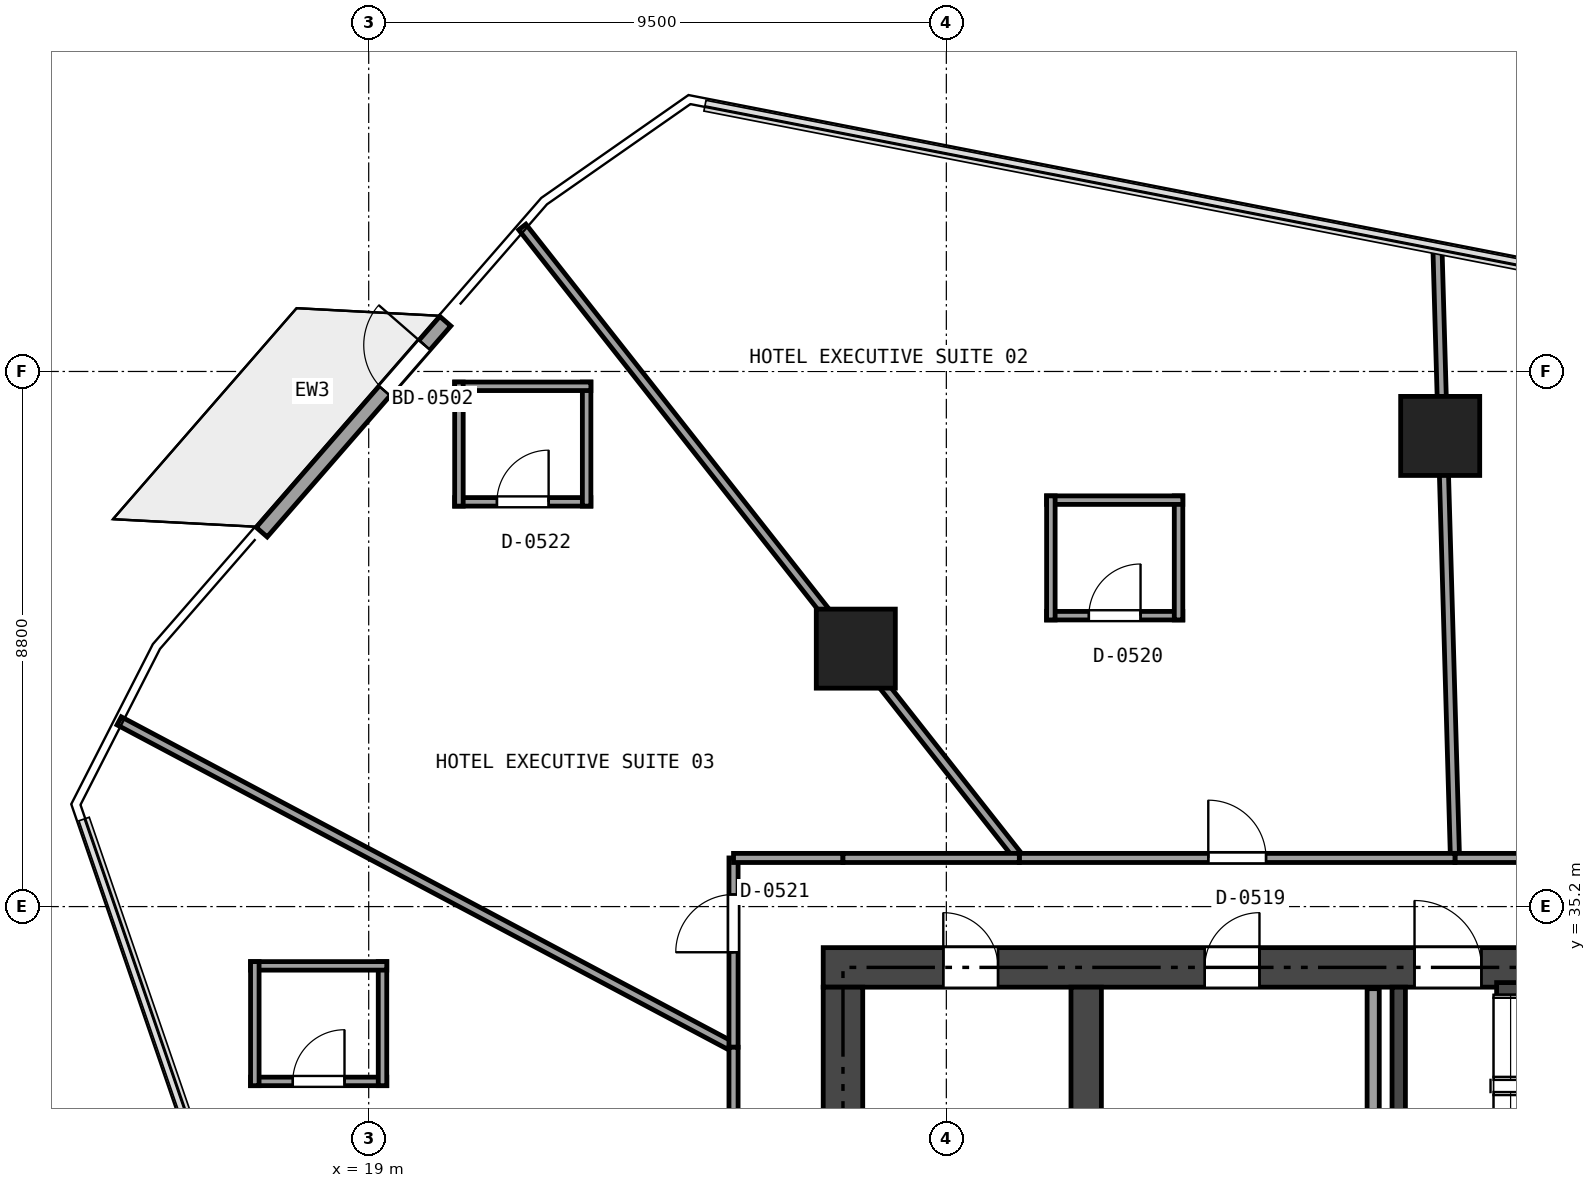
"""IFC4 building model, lengths in metres.
Left out: names, types, materials, properties, quantities, classifications, styles, units other than length and angle.
Written with IfcOpenShell. Run it as: python <this file> out.ifc"""

import sys

from ifc_helpers import new_model, si_unit, direction, frame, frame_2d, origin, origin_2d, place, context, subcontext, project, spatial, rectangle, extrude, element, fill, save


model = new_model("IFC4")
c1 = context("Model", 3, precision=1e-05, world=origin(), true_north=direction((0.0, 1.0)))
c2 = subcontext(c1, "Body", "Model", "MODEL_VIEW")
j1 = project(units=[si_unit("LENGTHUNIT", "METRE"), si_unit("PLANEANGLEUNIT", "RADIAN")], contexts=[c1])
p1 = place(None, origin())
s1 = spatial("IfcSite", under=j1, at=p1, CompositionType="ELEMENT")
p2 = place(p1, origin())
s2 = spatial("IfcBuilding", under=s1, at=p2, CompositionType="ELEMENT")
p3 = place(p2, frame((0.0, 0.0, 27.0)))
s3 = spatial("IfcBuildingStorey", under=s2, at=p3, CompositionType="ELEMENT", Elevation=27.0)
p4 = place(p3, frame((26.475, 34.2, 0.0), z_axis=(0.0, 0.0, 1.0), x_axis=(1.0, 0.0, 0.0)))
e1 = element("IfcWall", 1, at=p4, inside=s3, PredefinedType="SHEAR", context=c2, shape_type="SweptSolid", body=[
    extrude(rectangle(XDim=21.45, YDim=0.65, at=frame_2d((10.725, 0.0))), origin(), (0.0, 0.0, 1.0), 3.17),
])
p5 = place(p4, frame((9.725, 0.0, 0.0)))
e2 = element("IfcOpeningElement", 2, at=p5, cuts=e1, PredefinedType="OPENING", context=c2, shape_type="SweptSolid", body=[
    extrude(rectangle(XDim=1.1, YDim=2.15, at=frame_2d((0.55, 1.075))), frame((0.0, 0.335, 0.0), z_axis=(0.0, -1.0, 0.0), x_axis=(1.0, 0.0, 0.0)), (0.0, 0.0, 1.0), 0.67),
])
p6 = place(p4, frame((1.975, 0.0, 0.0)))
e3 = element("IfcOpeningElement", 3, at=p6, cuts=e1, PredefinedType="OPENING", context=c2, shape_type="SweptSolid", body=[
    extrude(rectangle(XDim=0.9, YDim=2.1, at=frame_2d((0.45, 1.05))), frame((0.0, 0.335, 0.0), z_axis=(0.0, -1.0, 0.0), x_axis=(1.0, 0.0, 0.0)), (0.0, 0.0, 1.0), 0.67),
])
p7 = place(p4, frame((6.275, 0.0, 0.0)))
e4 = element("IfcOpeningElement", 4, at=p7, cuts=e1, PredefinedType="OPENING", context=c2, shape_type="SweptSolid", body=[
    extrude(rectangle(XDim=0.9, YDim=2.1, at=frame_2d((0.45, 1.05))), frame((0.0, 0.335, 0.0), z_axis=(0.0, -1.0, 0.0), x_axis=(1.0, 0.0, 0.0)), (0.0, 0.0, 1.0), 0.67),
])
p8 = place(p3, frame((26.8, 18.925, 0.0), z_axis=(0.0, 0.0, 1.0), x_axis=(0.0, 1.0, 0.0)))
e5 = element("IfcWall", 5, at=p8, inside=s3, PredefinedType="SHEAR", context=c2, shape_type="SweptSolid", body=[
    extrude(rectangle(XDim=14.95, YDim=0.65, at=frame_2d((7.475, 0.0))), origin(), (0.0, 0.0, 1.0), 3.17),
])
p9 = place(p3, frame((30.8, 18.925, 0.0), z_axis=(0.0, 0.0, 1.0), x_axis=(0.0, 1.0, 0.0)))
e6 = element("IfcWall", 6, at=p9, inside=s3, PredefinedType="SHEAR", context=c2, shape_type="SweptSolid", body=[
    extrude(rectangle(XDim=14.95, YDim=0.5, at=frame_2d((7.475, 0.0))), origin(), (0.0, 0.0, 1.0), 3.17),
])
p10 = place(p9, frame((6.575, 0.0, 0.0)))
e7 = element("IfcOpeningElement", 7, at=p10, cuts=e6, PredefinedType="OPENING", context=c2, shape_type="SweptSolid", body=[
    extrude(rectangle(XDim=1.1, YDim=2.15, at=frame_2d((0.55, 1.075))), frame((0.0, 0.26, 0.0), z_axis=(0.0, -1.0, 0.0), x_axis=(1.0, 0.0, 0.0)), (0.0, 0.0, 1.0), 0.52),
])
p11 = place(p9, frame((8.375, 0.0, 0.0)))
e8 = element("IfcOpeningElement", 8, at=p11, cuts=e6, PredefinedType="OPENING", context=c2, shape_type="SweptSolid", body=[
    extrude(rectangle(XDim=0.9, YDim=2.1, at=frame_2d((0.45, 1.05))), frame((0.0, 0.26, 0.0), z_axis=(0.0, -1.0, 0.0), x_axis=(1.0, 0.0, 0.0)), (0.0, 0.0, 1.0), 0.52),
])
p12 = place(p3, frame((35.94, 30.75, 0.0), z_axis=(0.0, 0.0, 1.0), x_axis=(0.0, 1.0, 0.0)))
e9 = element("IfcWall", 9, at=p12, inside=s3, PredefinedType="SHEAR", context=c2, shape_type="SweptSolid", body=[
    extrude(rectangle(XDim=3.125, YDim=0.22, at=frame_2d((1.562, 0.0))), origin(), (0.0, 0.0, 1.0), 3.17),
])
p13 = place(p3, frame((37.55, 33.84, 0.0), z_axis=(0.0, 0.0, 1.0), x_axis=(1.0, 0.0, 0.0)))
e10 = element("IfcWall", 10, at=p13, inside=s3, PredefinedType="SHEAR", context=c2, shape_type="SweptSolid", body=[
    extrude(rectangle(XDim=5.9, YDim=0.22, at=frame_2d((2.95, 0.0))), origin(), (0.0, 0.0, 1.0), 3.17),
])
for number, where, z_axis, x_axis in (
    (11, (36.622, 42.94, -0.405), (0.0, 0.0, 1.0), (1.0, 0.0, 0.0)),
    (12, (27.011, 39.442, -0.405), (0.0, 0.0, 1.0), (1.0, 0.0, 0.0)),
):
    element("IfcColumn", number, at=place(p3, frame(where, z_axis=z_axis, x_axis=x_axis)), inside=s3, PredefinedType="COLUMN", context=c2, shape_type="SweptSolid", body=[
        extrude(rectangle(XDim=1.3, YDim=1.3, at=origin_2d()), origin(), (0.0, 0.0, 1.0), 3.575),
    ])
p14 = place(p3, frame((17.24, 41.358, 0.0), z_axis=(0.0, 0.0, 1.0), x_axis=(0.656612282537, 0.754228288001, 0.0)))
e13 = element("IfcWall", 13, at=p14, inside=s3, PredefinedType="SOLIDWALL", context=c2, shape_type="SweptSolid", body=[
    extrude(rectangle(XDim=4.599, YDim=0.24, at=frame_2d((2.3, 0.0))), origin(), (0.0, 0.0, 1.0), 3.17),
])
p15 = place(p14, frame((3.079, 0.0, 0.0)))
e14 = element("IfcOpeningElement", 14, at=p15, cuts=e13, PredefinedType="OPENING", context=c2, shape_type="SweptSolid", body=[
    extrude(rectangle(XDim=1.0, YDim=2.15, at=frame_2d((0.5, 1.075))), frame((0.0, 0.13, 0.0), z_axis=(0.0, -1.0, 0.0), x_axis=(1.0, 0.0, 0.0)), (0.0, 0.0, 1.0), 0.26),
])
p16 = place(p3, frame((35.52, 18.95, 0.0), z_axis=(0.0, 0.0, 1.0), x_axis=(0.0, 1.0, 0.0)))
e15 = element("IfcWall", 15, at=p16, inside=s3, PredefinedType="SOLIDWALL", context=c2, shape_type="SweptSolid", body=[
    extrude(rectangle(XDim=14.9, YDim=0.2, at=frame_2d((7.45, 0.0))), origin(), (0.0, 0.0, 1.0), 2.691),
])
p17 = place(p16, frame((7.755, 0.0, 0.0)))
e16 = element("IfcOpeningElement", 16, at=p17, cuts=e15, PredefinedType="OPENING", context=c2, shape_type="SweptSolid", body=[
    extrude(rectangle(XDim=0.95, YDim=2.15, at=frame_2d((0.475, 1.075))), frame((0.0, 0.11, 0.0), z_axis=(0.0, -1.0, 0.0), x_axis=(1.0, 0.0, 0.0)), (0.0, 0.0, 1.0), 0.22),
])
p18 = place(p16, frame((0.6, 0.0, 0.0)))
e17 = element("IfcOpeningElement", 17, at=p18, cuts=e15, PredefinedType="OPENING", context=c2, shape_type="SweptSolid", body=[
    extrude(rectangle(XDim=0.9, YDim=2.1, at=frame_2d((0.45, 1.05))), frame((0.0, 0.11, 0.0), z_axis=(0.0, -1.0, 0.0), x_axis=(1.0, 0.0, 0.0)), (0.0, 0.0, 1.0), 0.22),
])
p19 = place(p3, frame((30.149, 39.984, 0.0), z_axis=(0.0, 0.0, 1.0), x_axis=(1.0, 0.0, 0.0)))
e18 = element("IfcWall", 18, at=p19, inside=s3, PredefinedType="PARTITIONING", context=c2, shape_type="SweptSolid", body=[
    extrude(rectangle(XDim=2.24, YDim=0.14, at=frame_2d((1.12, 0.0))), origin(), (0.0, 0.0, 1.0), 3.17),
])
p20 = place(p19, frame((0.695, 0.0, 0.0)))
e19 = element("IfcOpeningElement", 19, at=p20, cuts=e18, PredefinedType="OPENING", context=c2, shape_type="SweptSolid", body=[
    extrude(rectangle(XDim=0.85, YDim=2.1, at=frame_2d((0.425, 1.05))), frame((0.0, 0.08, 0.0), z_axis=(0.0, -1.0, 0.0), x_axis=(1.0, 0.0, 0.0)), (0.0, 0.0, 1.0), 0.16),
])
p21 = place(p3, frame((32.319, 39.914, 0.0), z_axis=(0.0, 0.0, 1.0), x_axis=(0.0, 1.0, 0.0)))
e20 = element("IfcWall", 20, at=p21, inside=s3, PredefinedType="PARTITIONING", context=c2, shape_type="SweptSolid", body=[
    extrude(rectangle(XDim=2.04, YDim=0.14, at=frame_2d((1.02, 0.0))), origin(), (0.0, 0.0, 1.0), 2.355),
])
p22 = place(p3, frame((32.389, 41.884, 0.0), z_axis=(0.0, 0.0, 1.0), x_axis=(-1.0, 0.0, 0.0)))
e21 = element("IfcWall", 21, at=p22, inside=s3, PredefinedType="PARTITIONING", context=c2, shape_type="SweptSolid", body=[
    extrude(rectangle(XDim=2.24, YDim=0.14, at=frame_2d((1.12, 0.0))), origin(), (0.0, 0.0, 1.0), 3.17),
])
p23 = place(p3, frame((30.219, 41.954, 0.0), z_axis=(0.0, 0.0, 1.0), x_axis=(0.0, -1.0, 0.0)))
e22 = element("IfcWall", 22, at=p23, inside=s3, PredefinedType="PARTITIONING", context=c2, shape_type="SweptSolid", body=[
    extrude(rectangle(XDim=2.04, YDim=0.14, at=frame_2d((1.02, 0.0))), origin(), (0.0, 0.0, 1.0), 2.355),
])
p24 = place(p3, frame((20.414, 41.856, 0.0), z_axis=(0.0, 0.0, 1.0), x_axis=(1.0, 0.0, 0.0)))
e23 = element("IfcWall", 23, at=p24, inside=s3, PredefinedType="PARTITIONING", context=c2, shape_type="SweptSolid", body=[
    extrude(rectangle(XDim=2.24, YDim=0.14, at=frame_2d((1.12, 0.0))), origin(), (0.0, 0.0, 1.0), 3.17),
])
p25 = place(p24, frame((0.695, 0.0, 0.0)))
e24 = element("IfcOpeningElement", 24, at=p25, cuts=e23, PredefinedType="OPENING", context=c2, shape_type="SweptSolid", body=[
    extrude(rectangle(XDim=0.85, YDim=2.1, at=frame_2d((0.425, 1.05))), frame((0.0, 0.08, 0.0), z_axis=(0.0, -1.0, 0.0), x_axis=(1.0, 0.0, 0.0)), (0.0, 0.0, 1.0), 0.16),
])
p26 = place(p3, frame((22.584, 41.786, 0.0), z_axis=(0.0, 0.0, 1.0), x_axis=(0.0, 1.0, 0.0)))
e25 = element("IfcWall", 25, at=p26, inside=s3, PredefinedType="PARTITIONING", context=c2, shape_type="SweptSolid", body=[
    extrude(rectangle(XDim=2.04, YDim=0.14, at=frame_2d((1.02, 0.0))), origin(), (0.0, 0.0, 1.0), 3.17),
])
p27 = place(p3, frame((22.654, 43.756, 0.0), z_axis=(0.0, 0.0, 1.0), x_axis=(-1.0, 0.0, 0.0)))
e26 = element("IfcWall", 26, at=p27, inside=s3, PredefinedType="PARTITIONING", context=c2, shape_type="SweptSolid", body=[
    extrude(rectangle(XDim=2.24, YDim=0.14, at=frame_2d((1.12, 0.0))), origin(), (0.0, 0.0, 1.0), 3.17),
])
p28 = place(p3, frame((20.484, 43.826, 0.0), z_axis=(0.0, 0.0, 1.0), x_axis=(0.0, -1.0, 0.0)))
e27 = element("IfcWall", 27, at=p28, inside=s3, PredefinedType="PARTITIONING", context=c2, shape_type="SweptSolid", body=[
    extrude(rectangle(XDim=2.04, YDim=0.14, at=frame_2d((1.02, 0.0))), origin(), (0.0, 0.0, 1.0), 3.17),
])
p29 = place(p3, frame((17.057, 32.325, 0.0), z_axis=(0.0, 0.0, 1.0), x_axis=(1.0, 0.0, 0.0)))
e28 = element("IfcWall", 28, at=p29, inside=s3, PredefinedType="PARTITIONING", context=c2, shape_type="SweptSolid", body=[
    extrude(rectangle(XDim=2.24, YDim=0.14, at=frame_2d((1.12, 0.0))), origin(), (0.0, 0.0, 1.0), 3.17),
])
p30 = place(p29, frame((0.695, 0.0, 0.0)))
e29 = element("IfcOpeningElement", 29, at=p30, cuts=e28, PredefinedType="OPENING", context=c2, shape_type="SweptSolid", body=[
    extrude(rectangle(XDim=0.85, YDim=2.1, at=frame_2d((0.425, 1.05))), frame((0.0, 0.08, 0.0), z_axis=(0.0, -1.0, 0.0), x_axis=(1.0, 0.0, 0.0)), (0.0, 0.0, 1.0), 0.16),
])
p31 = place(p3, frame((19.227, 32.255, 0.0), z_axis=(0.0, 0.0, 1.0), x_axis=(0.0, 1.0, 0.0)))
e30 = element("IfcWall", 30, at=p31, inside=s3, PredefinedType="PARTITIONING", context=c2, shape_type="SweptSolid", body=[
    extrude(rectangle(XDim=2.04, YDim=0.14, at=frame_2d((1.02, 0.0))), origin(), (0.0, 0.0, 1.0), 3.17),
])
p32 = place(p3, frame((19.297, 34.225, 0.0), z_axis=(0.0, 0.0, 1.0), x_axis=(-1.0, 0.0, 0.0)))
e31 = element("IfcWall", 31, at=p32, inside=s3, PredefinedType="PARTITIONING", context=c2, shape_type="SweptSolid", body=[
    extrude(rectangle(XDim=2.24, YDim=0.14, at=frame_2d((1.12, 0.0))), origin(), (0.0, 0.0, 1.0), 3.17),
])
p33 = place(p3, frame((17.127, 34.295, 0.0), z_axis=(0.0, 0.0, 1.0), x_axis=(0.0, -1.0, 0.0)))
e32 = element("IfcWall", 32, at=p33, inside=s3, PredefinedType="PARTITIONING", context=c2, shape_type="SweptSolid", body=[
    extrude(rectangle(XDim=2.04, YDim=0.14, at=frame_2d((1.02, 0.0))), origin(), (0.0, 0.0, 1.0), 3.17),
])
p34 = place(p3, frame((36.576, 46.063, 0.0), z_axis=(0.0, 0.0, 1.0), x_axis=(0.028713470257, -0.99958768331, 0.0)))
e33 = element("IfcWall", 33, at=p34, inside=s3, PredefinedType="PARTITIONING", context=c2, shape_type="SweptSolid", body=[
    extrude(rectangle(XDim=10.067, YDim=0.15, at=frame_2d((5.034, 0.0))), origin(), (0.0, 0.0, 1.0), 2.395),
])
p35 = place(p3, frame((36.865, 36.0, 0.0), z_axis=(0.0, 0.0, 1.0), x_axis=(1.0, 0.0, 0.0)))
e34 = element("IfcWall", 34, at=p35, inside=s3, PredefinedType="PARTITIONING", context=c2, shape_type="SweptSolid", body=[
    extrude(rectangle(XDim=7.31, YDim=0.15, at=frame_2d((3.655, 0.0))), origin(), (0.0, 0.0, 1.0), 2.395),
])
p36 = place(p35, frame((3.18, 0.0, 0.0)))
e35 = element("IfcOpeningElement", 35, at=p36, cuts=e34, PredefinedType="OPENING", context=c2, shape_type="SweptSolid", body=[
    extrude(rectangle(XDim=0.95, YDim=2.15, at=frame_2d((0.475, 1.075))), frame((0.0, 0.085, 0.0), z_axis=(0.0, -1.0, 0.0), x_axis=(1.0, 0.0, 0.0)), (0.0, 0.0, 1.0), 0.17),
])
p37 = place(p3, frame((21.526, 46.376, 0.0), z_axis=(0.0, 0.0, 1.0), x_axis=(0.618828337745, -0.785526249341, 0.0)))
e36 = element("IfcWall", 36, at=p37, inside=s3, PredefinedType="PARTITIONING", context=c2, shape_type="SweptSolid", body=[
    extrude(rectangle(XDim=13.209, YDim=0.15, at=frame_2d((6.604, 0.0))), origin(), (0.0, 0.0, 1.0), 2.395),
])
p38 = place(p3, frame((29.7, 36.0, 0.0), z_axis=(0.0, 0.0, 1.0), x_axis=(1.0, 0.0, 0.0)))
e37 = element("IfcWall", 37, at=p38, inside=s3, PredefinedType="PARTITIONING", context=c2, shape_type="SweptSolid", body=[
    extrude(rectangle(XDim=7.165, YDim=0.15, at=frame_2d((3.583, 0.0))), origin(), (0.0, 0.0, 1.0), 2.395),
])
p39 = place(p38, frame((3.108, 0.0, 0.0)))
e38 = element("IfcOpeningElement", 38, at=p39, cuts=e37, PredefinedType="OPENING", context=c2, shape_type="SweptSolid", body=[
    extrude(rectangle(XDim=0.95, YDim=2.15, at=frame_2d((0.475, 1.075))), frame((0.0, 0.085, 0.0), z_axis=(0.0, -1.0, 0.0), x_axis=(1.0, 0.0, 0.0)), (0.0, 0.0, 1.0), 0.17),
])
p40 = place(p3, frame((14.896, 38.254, 0.0), z_axis=(0.0, 0.0, 1.0), x_axis=(0.883145004314, -0.469100097372, 0.0)))
e39 = element("IfcWall", 39, at=p40, inside=s3, PredefinedType="PARTITIONING", context=c2, shape_type="SweptSolid", body=[
    extrude(rectangle(XDim=11.441, YDim=0.15, at=frame_2d((5.72, 0.0))), origin(), (0.0, 0.0, 1.0), 2.355),
])
p41 = place(p3, frame((25.0, 32.887, 0.0), z_axis=(0.0, 0.0, 1.0), x_axis=(0.0, 1.0, 0.0)))
e40 = element("IfcWall", 40, at=p41, inside=s3, PredefinedType="PARTITIONING", context=c2, shape_type="SweptSolid", body=[
    extrude(rectangle(XDim=3.113, YDim=0.15, at=frame_2d((1.557, 0.0))), origin(), (0.0, 0.0, 1.0), 2.355),
])
p42 = place(p41, frame((1.562, 0.0, 0.0)))
e41 = element("IfcOpeningElement", 41, at=p42, cuts=e40, PredefinedType="OPENING", context=c2, shape_type="SweptSolid", body=[
    extrude(rectangle(XDim=0.95, YDim=2.15, at=frame_2d((0.475, 1.075))), frame((0.0, 0.085, 0.0), z_axis=(0.0, -1.0, 0.0), x_axis=(1.0, 0.0, 0.0)), (0.0, 0.0, 1.0), 0.17),
])
p43 = place(p3, frame((25.0, 36.0, 0.0), z_axis=(0.0, 0.0, 1.0), x_axis=(1.0, 0.0, 0.0)))
e42 = element("IfcWall", 42, at=p43, inside=s3, PredefinedType="PARTITIONING", context=c2, shape_type="SweptSolid", body=[
    extrude(rectangle(XDim=1.8, YDim=0.15, at=frame_2d((0.9, 0.0))), origin(), (0.0, 0.0, 1.0), 2.355),
])
p44 = place(p3, frame((26.8, 36.0, 0.0), z_axis=(0.0, 0.0, 1.0), x_axis=(1.0, 0.0, 0.0)))
e43 = element("IfcWall", 43, at=p44, inside=s3, PredefinedType="PARTITIONING", context=c2, shape_type="SweptSolid", body=[
    extrude(rectangle(XDim=2.9, YDim=0.15, at=frame_2d((1.45, 0.0))), origin(), (0.0, 0.0, 1.0), 2.395),
])
p45 = place(p3, frame((25.0, 27.682, 0.0), z_axis=(0.0, 0.0, 1.0), x_axis=(0.0, 1.0, 0.0)))
e44 = element("IfcWall", 44, at=p45, inside=s3, PredefinedType="PARTITIONING", context=c2, shape_type="SweptSolid", body=[
    extrude(rectangle(XDim=5.205, YDim=0.15, at=frame_2d((2.603, 0.0))), origin(), (0.0, 0.0, 1.0), 2.395),
])
p46 = place(p45, frame((2.128, 0.0, 0.0)))
e45 = element("IfcOpeningElement", 45, at=p46, cuts=e44, PredefinedType="OPENING", context=c2, shape_type="SweptSolid", body=[
    extrude(rectangle(XDim=0.95, YDim=2.15, at=frame_2d((0.475, 1.075))), frame((0.0, 0.085, 0.0), z_axis=(0.0, -1.0, 0.0), x_axis=(1.0, 0.0, 0.0)), (0.0, 0.0, 1.0), 0.17),
])
p47 = place(p15, origin())
e46 = element("IfcDoor", 46, at=p47, inside=s3, OperationType="SINGLE_SWING_RIGHT", PredefinedType="DOOR", context=c2, shape_type="SweptSolid", body=[
    extrude(rectangle(XDim=1.0, YDim=2.15, at=frame_2d((0.5, 1.075))), frame((0.0, 0.025, 0.0), z_axis=(0.0, -1.0, 0.0), x_axis=(1.0, 0.0, 0.0)), (0.0, 0.0, 1.0), 0.05),
])
fill(e14, e46)
p48 = place(p5, origin())
e47 = element("IfcDoor", 47, at=p48, inside=s3, OperationType="SINGLE_SWING_LEFT", PredefinedType="DOOR", context=c2, shape_type="SweptSolid", body=[
    extrude(rectangle(XDim=1.1, YDim=2.15, at=frame_2d((0.55, 1.075))), frame((0.0, 0.025, 0.0), z_axis=(0.0, -1.0, 0.0), x_axis=(1.0, 0.0, 0.0)), (0.0, 0.0, 1.0), 0.05),
])
fill(e2, e47)
p49 = place(p6, origin())
e48 = element("IfcDoor", 48, at=p49, inside=s3, OperationType="SINGLE_SWING_LEFT", PredefinedType="DOOR", context=c2, shape_type="SweptSolid", body=[
    extrude(rectangle(XDim=0.9, YDim=2.1, at=frame_2d((0.45, 1.05))), frame((0.0, 0.025, 0.0), z_axis=(0.0, -1.0, 0.0), x_axis=(1.0, 0.0, 0.0)), (0.0, 0.0, 1.0), 0.05),
])
fill(e3, e48)
p50 = place(p7, origin())
e49 = element("IfcDoor", 49, at=p50, inside=s3, OperationType="SINGLE_SWING_RIGHT", PredefinedType="DOOR", context=c2, shape_type="SweptSolid", body=[
    extrude(rectangle(XDim=0.9, YDim=2.1, at=frame_2d((0.45, 1.05))), frame((0.0, 0.025, 0.0), z_axis=(0.0, -1.0, 0.0), x_axis=(1.0, 0.0, 0.0)), (0.0, 0.0, 1.0), 0.05),
])
fill(e4, e49)
p51 = place(p39, origin())
e50 = element("IfcDoor", 50, at=p51, inside=s3, OperationType="SINGLE_SWING_LEFT", PredefinedType="DOOR", context=c2, shape_type="SweptSolid", body=[
    extrude(rectangle(XDim=0.95, YDim=2.15, at=frame_2d((0.475, 1.075))), frame((0.0, 0.025, 0.0), z_axis=(0.0, -1.0, 0.0), x_axis=(1.0, 0.0, 0.0)), (0.0, 0.0, 1.0), 0.05),
])
fill(e38, e50)
p52 = place(p20, origin())
e51 = element("IfcDoor", 51, at=p52, inside=s3, OperationType="SINGLE_SWING_RIGHT", PredefinedType="DOOR", context=c2, shape_type="SweptSolid", body=[
    extrude(rectangle(XDim=0.85, YDim=2.1, at=frame_2d((0.425, 1.05))), frame((0.0, 0.025, 0.0), z_axis=(0.0, -1.0, 0.0), x_axis=(1.0, 0.0, 0.0)), (0.0, 0.0, 1.0), 0.05),
])
fill(e19, e51)
p53 = place(p42, origin())
e52 = element("IfcDoor", 52, at=p53, inside=s3, OperationType="SINGLE_SWING_LEFT", PredefinedType="DOOR", context=c2, shape_type="SweptSolid", body=[
    extrude(rectangle(XDim=0.95, YDim=2.15, at=frame_2d((0.475, 1.075))), frame((0.0, 0.025, 0.0), z_axis=(0.0, -1.0, 0.0), x_axis=(1.0, 0.0, 0.0)), (0.0, 0.0, 1.0), 0.05),
])
fill(e41, e52)
p54 = place(p25, origin())
e53 = element("IfcDoor", 53, at=p54, inside=s3, OperationType="SINGLE_SWING_RIGHT", PredefinedType="DOOR", context=c2, shape_type="SweptSolid", body=[
    extrude(rectangle(XDim=0.85, YDim=2.1, at=frame_2d((0.425, 1.05))), frame((0.0, 0.025, 0.0), z_axis=(0.0, -1.0, 0.0), x_axis=(1.0, 0.0, 0.0)), (0.0, 0.0, 1.0), 0.05),
])
fill(e24, e53)
p55 = place(p30, origin())
e54 = element("IfcDoor", 54, at=p55, inside=s3, OperationType="SINGLE_SWING_RIGHT", PredefinedType="DOOR", context=c2, shape_type="SweptSolid", body=[
    extrude(rectangle(XDim=0.85, YDim=2.1, at=frame_2d((0.425, 1.05))), frame((0.0, 0.025, 0.0), z_axis=(0.0, -1.0, 0.0), x_axis=(1.0, 0.0, 0.0)), (0.0, 0.0, 1.0), 0.05),
])
fill(e29, e54)
save(model, sys.argv[1])
